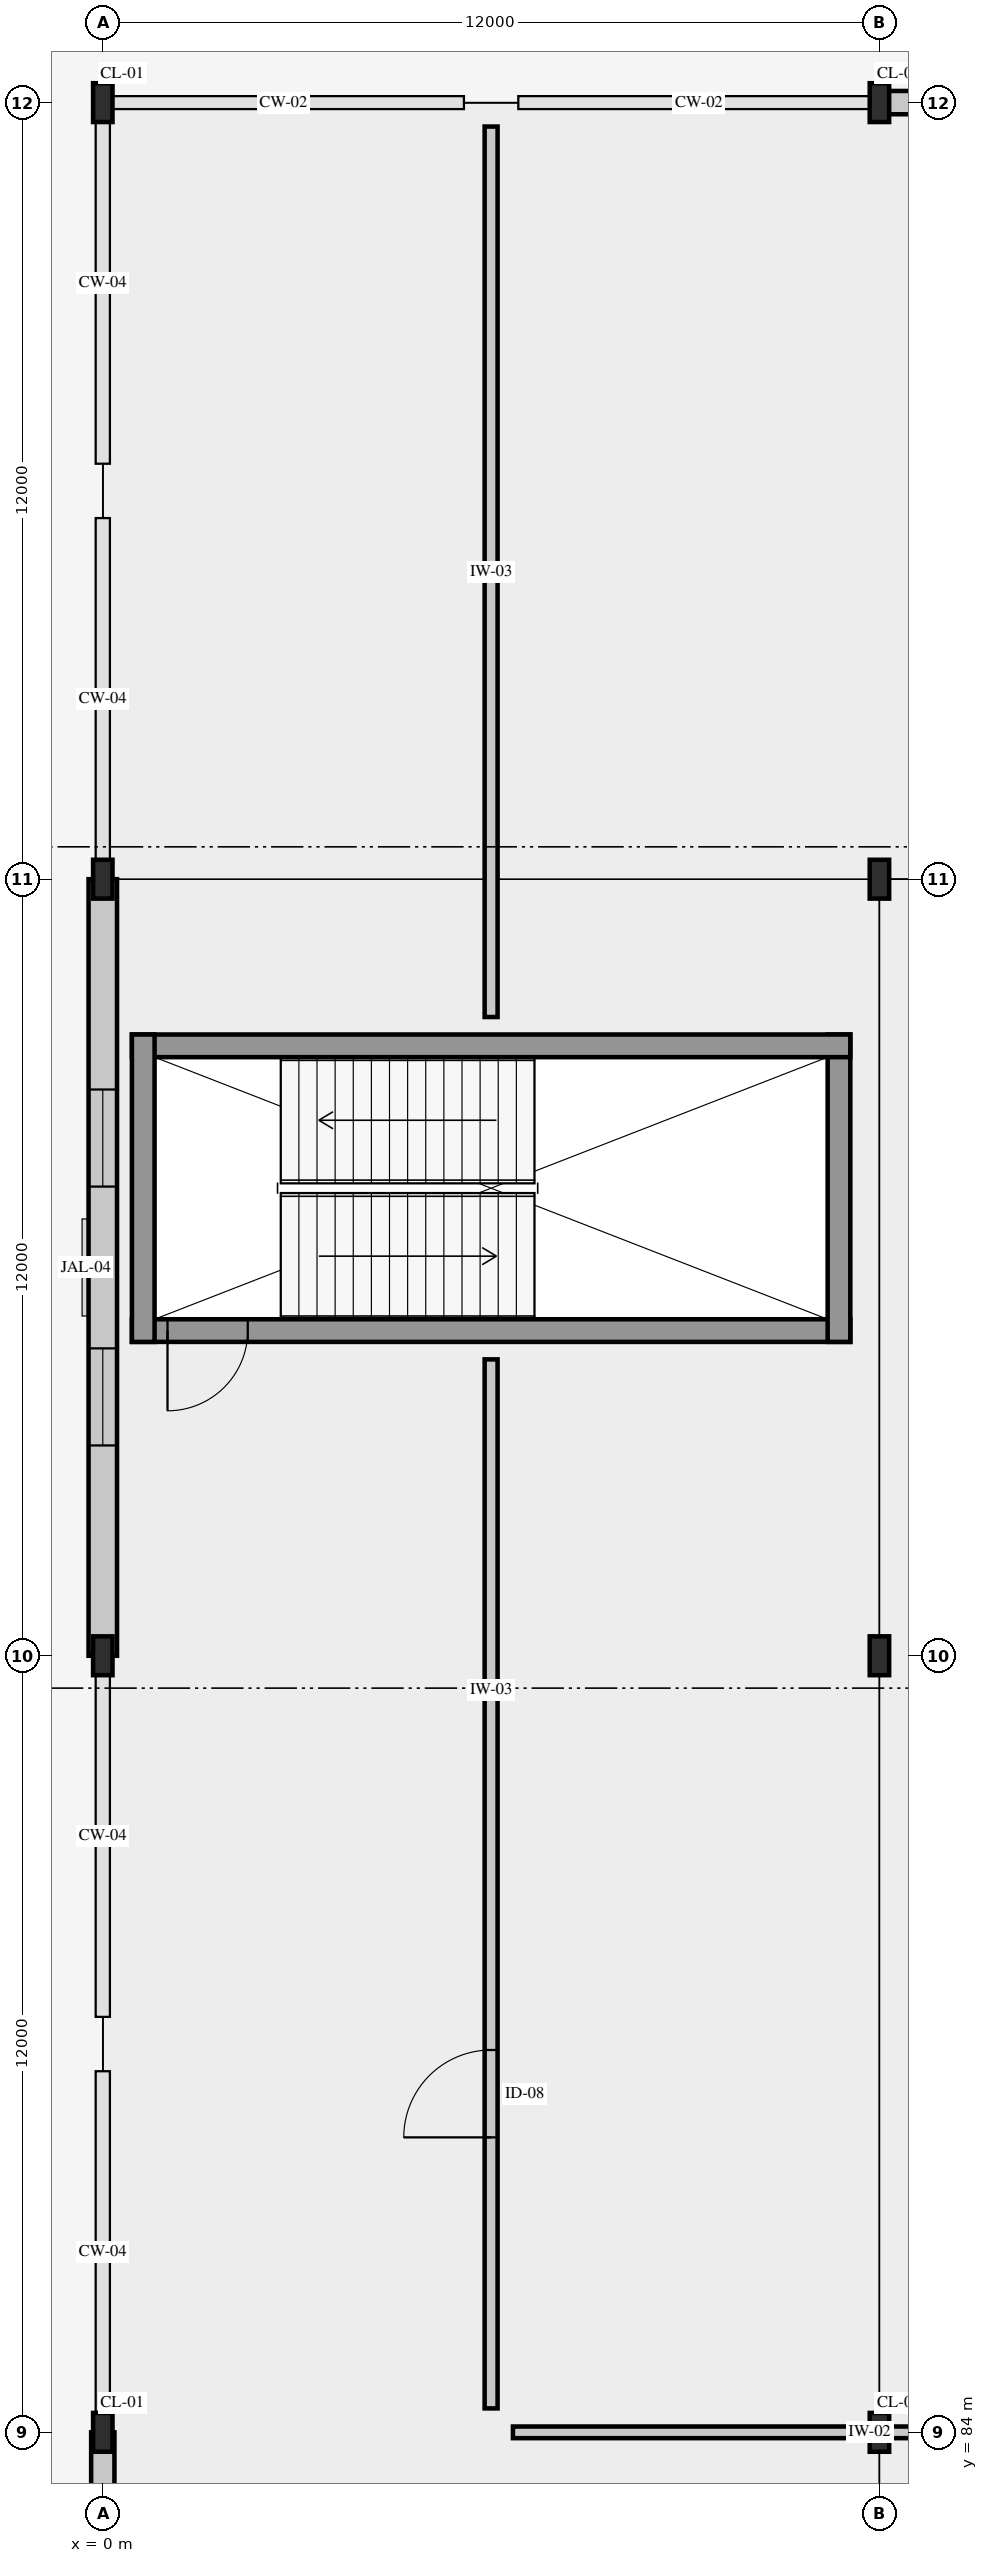
"""IFC4 building model, lengths in metres.
Left out: names, types, materials, properties, quantities, classifications, styles, units other than length and angle.
Written with IfcOpenShell. Run it as: python <this file> out.ifc"""

import sys

from ifc_helpers import new_model, si_unit, direction, frame, frame_2d, origin, origin_2d, place, context, subcontext, project, spatial, rectangle, i_section, extrude, element, fill, save


model = new_model("IFC4")
c1 = context("Model", 3, precision=1e-05, world=origin(), true_north=direction((0.0, 1.0)))
c2 = subcontext(c1, "Body", "Model", "MODEL_VIEW")
j1 = project(units=[si_unit("LENGTHUNIT", "METRE"), si_unit("PLANEANGLEUNIT", "RADIAN")], contexts=[c1])
p1 = place(None, origin())
s1 = spatial("IfcSite", under=j1, at=p1, CompositionType="ELEMENT")
p2 = place(p1, origin())
s2 = spatial("IfcBuilding", under=s1, at=p2, CompositionType="ELEMENT")
p3 = place(p2, origin())
s3 = spatial("IfcBuildingStorey", under=s2, at=p3, CompositionType="ELEMENT", Elevation=0.0)
for number, where, z_axis, x_axis in (
    (1, (0.0, 84.0, 0.0), (0.0, 0.0, 1.0), (1.0, 0.0, 0.0)),
    (2, (0.0, 96.0, 0.0), (0.0, 0.0, 1.0), (1.0, 0.0, 0.0)),
    (3, (0.0, 108.0, 0.0), (0.0, 0.0, 1.0), (1.0, 0.0, 0.0)),
    (4, (0.0, 120.0, 0.0), (0.0, 0.0, 1.0), (1.0, 0.0, 0.0)),
    (5, (12.0, 84.0, 0.0), (0.0, 0.0, 1.0), (1.0, 0.0, 0.0)),
    (6, (12.0, 96.0, 0.0), (0.0, 0.0, 1.0), (1.0, 0.0, 0.0)),
    (7, (12.0, 108.0, 0.0), (0.0, 0.0, 1.0), (1.0, 0.0, 0.0)),
    (8, (12.0, 120.0, 0.0), (0.0, 0.0, 1.0), (1.0, 0.0, 0.0)),
):
    element("IfcColumn", number, at=place(p3, frame(where, z_axis=z_axis, x_axis=x_axis)), inside=s3, PredefinedType="COLUMN", context=c2, shape_type="SweptSolid", body=[
        extrude(i_section(OverallWidth=0.3, OverallDepth=0.6, WebThickness=0.015, FlangeThickness=0.03, FilletRadius=0.027, at=origin_2d()), origin(), (0.0, 0.0, 1.0), 5.4),
    ])
p4 = place(p3, frame((0.0, 84.0, 0.0), z_axis=(0.0, 0.0, 1.0), x_axis=(0.0, -1.0, 0.0)))
e9 = element("IfcWall", 9, at=p4, inside=s3, PredefinedType="SOLIDWALL", context=c2, shape_type="SweptSolid", body=[
    extrude(rectangle(XDim=9.6, YDim=0.36, at=frame_2d((4.8, 0.0))), origin(), (0.0, 0.0, 1.0), 4.52),
])
p5 = place(p4, frame((2.525, 0.0, 0.95)))
e10 = element("IfcOpeningElement", 10, at=p5, cuts=e9, PredefinedType="OPENING", context=c2, shape_type="SweptSolid", body=[
    extrude(rectangle(XDim=1.35, YDim=1.5, at=frame_2d((0.675, 0.75))), frame((0.0, 0.19, 0.0), z_axis=(0.0, -1.0, 0.0), x_axis=(1.0, 0.0, 0.0)), (0.0, 0.0, 1.0), 0.38),
])
p6 = place(p4, frame((5.725, 0.0, 0.95)))
e11 = element("IfcOpeningElement", 11, at=p6, cuts=e9, PredefinedType="OPENING", context=c2, shape_type="SweptSolid", body=[
    extrude(rectangle(XDim=1.35, YDim=1.5, at=frame_2d((0.675, 0.75))), frame((0.0, 0.19, 0.0), z_axis=(0.0, -1.0, 0.0), x_axis=(1.0, 0.0, 0.0)), (0.0, 0.0, 1.0), 0.38),
])
p7 = place(p3, frame((0.0, 108.0, 0.0), z_axis=(0.0, 0.0, 1.0), x_axis=(0.0, -1.0, 0.0)))
e12 = element("IfcWall", 12, at=p7, inside=s3, PredefinedType="SOLIDWALL", context=c2, shape_type="SweptSolid", body=[
    extrude(rectangle(XDim=12.0, YDim=0.44, at=frame_2d((6.0, 0.0))), origin(), (0.0, 0.0, 1.0), 4.52),
])
p8 = place(p7, frame((3.25, 0.0, 0.95)))
e13 = element("IfcOpeningElement", 13, at=p8, cuts=e12, PredefinedType="OPENING", context=c2, shape_type="SweptSolid", body=[
    extrude(rectangle(XDim=1.5, YDim=1.5, at=frame_2d((0.75, 0.75))), frame((0.0, 0.23, 0.0), z_axis=(0.0, -1.0, 0.0), x_axis=(1.0, 0.0, 0.0)), (0.0, 0.0, 1.0), 0.46),
])
p9 = place(p7, frame((7.25, 0.0, 0.95)))
e14 = element("IfcOpeningElement", 14, at=p9, cuts=e12, PredefinedType="OPENING", context=c2, shape_type="SweptSolid", body=[
    extrude(rectangle(XDim=1.5, YDim=1.5, at=frame_2d((0.75, 0.75))), frame((0.0, 0.23, 0.0), z_axis=(0.0, -1.0, 0.0), x_axis=(1.0, 0.0, 0.0)), (0.0, 0.0, 1.0), 0.46),
])
p10 = place(p3, frame((24.0, 120.0, 0.0), z_axis=(0.0, 0.0, 1.0), x_axis=(-1.0, 0.0, 0.0)))
e15 = element("IfcWall", 15, at=p10, inside=s3, PredefinedType="SOLIDWALL", context=c2, shape_type="SweptSolid", body=[
    extrude(rectangle(XDim=12.0, YDim=0.36, at=frame_2d((6.0, 0.0))), origin(), (0.0, 0.0, 1.0), 4.56),
])
p11 = place(p10, frame((1.96, 0.0, 0.0)))
e16 = element("IfcOpeningElement", 16, at=p11, cuts=e15, PredefinedType="OPENING", context=c2, shape_type="SweptSolid", body=[
    extrude(rectangle(XDim=2.8, YDim=2.8, at=frame_2d((1.4, 1.4))), frame((0.0, 0.19, 0.0), z_axis=(0.0, -1.0, 0.0), x_axis=(1.0, 0.0, 0.0)), (0.0, 0.0, 1.0), 0.38),
])
p12 = place(p10, frame((7.44, 0.0, 0.0)))
e17 = element("IfcOpeningElement", 17, at=p12, cuts=e15, PredefinedType="OPENING", context=c2, shape_type="SweptSolid", body=[
    extrude(rectangle(XDim=2.4, YDim=2.6, at=frame_2d((1.2, 1.3))), frame((0.0, 0.19, 0.0), z_axis=(0.0, -1.0, 0.0), x_axis=(1.0, 0.0, 0.0)), (0.0, 0.0, 1.0), 0.38),
])
p13 = place(p3, frame((0.45, 101.025, 0.0), z_axis=(0.0, 0.0, 1.0), x_axis=(1.0, 0.0, 0.0)))
e18 = element("IfcWall", 18, at=p13, inside=s3, PredefinedType="SHEAR", context=c2, shape_type="SweptSolid", body=[
    extrude(rectangle(XDim=11.1, YDim=0.35, at=frame_2d((5.55, 0.0))), origin(), (0.0, 0.0, 1.0), 5.14),
])
p14 = place(p13, frame((0.55, 0.0, 0.0)))
e19 = element("IfcOpeningElement", 19, at=p14, cuts=e18, PredefinedType="OPENING", context=c2, shape_type="SweptSolid", body=[
    extrude(rectangle(XDim=1.24, YDim=2.25, at=frame_2d((0.62, 1.125))), frame((0.0, 0.185, 0.0), z_axis=(0.0, -1.0, 0.0), x_axis=(1.0, 0.0, 0.0)), (0.0, 0.0, 1.0), 0.37),
])
p15 = place(p3, frame((11.375, 100.85, 0.0), z_axis=(0.0, 0.0, 1.0), x_axis=(0.0, 1.0, 0.0)))
e20 = element("IfcWall", 20, at=p15, inside=s3, PredefinedType="SHEAR", context=c2, shape_type="SweptSolid", body=[
    extrude(rectangle(XDim=4.75, YDim=0.35, at=frame_2d((2.375, 0.0))), origin(), (0.0, 0.0, 1.0), 5.14),
])
p16 = place(p3, frame((11.55, 105.425, 0.0), z_axis=(0.0, 0.0, 1.0), x_axis=(-1.0, 0.0, 0.0)))
e21 = element("IfcWall", 21, at=p16, inside=s3, PredefinedType="SHEAR", context=c2, shape_type="SweptSolid", body=[
    extrude(rectangle(XDim=11.1, YDim=0.35, at=frame_2d((5.55, 0.0))), origin(), (0.0, 0.0, 1.0), 5.14),
])
p17 = place(p3, frame((0.625, 105.6, 0.0), z_axis=(0.0, 0.0, 1.0), x_axis=(0.0, -1.0, 0.0)))
e22 = element("IfcWall", 22, at=p17, inside=s3, PredefinedType="SHEAR", context=c2, shape_type="SweptSolid", body=[
    extrude(rectangle(XDim=4.75, YDim=0.35, at=frame_2d((2.375, 0.0))), origin(), (0.0, 0.0, 1.0), 5.14),
])
p18 = place(p3, frame((6.337, 84.0, 0.0), z_axis=(0.0, 0.0, 1.0), x_axis=(1.0, 0.0, 0.0)))
e23 = element("IfcWall", 23, at=p18, inside=s3, PredefinedType="PARTITIONING", context=c2, shape_type="SweptSolid", body=[
    extrude(rectangle(XDim=17.105, YDim=0.18, at=frame_2d((8.553, 0.0))), origin(), (0.0, 0.0, 1.0), 4.53),
])
p19 = place(p18, frame((11.374, 0.0, 0.0)))
e24 = element("IfcOpeningElement", 24, at=p19, cuts=e23, PredefinedType="OPENING", context=c2, shape_type="SweptSolid", body=[
    extrude(rectangle(XDim=1.2, YDim=2.3, at=frame_2d((0.6, 1.15))), frame((0.0, 0.1, 0.0), z_axis=(0.0, -1.0, 0.0), x_axis=(1.0, 0.0, 0.0)), (0.0, 0.0, 1.0), 0.2),
])
p20 = place(p3, frame((6.0, 84.37, 0.0), z_axis=(0.0, 0.0, 1.0), x_axis=(0.0, 1.0, 0.0)))
e25 = element("IfcWall", 25, at=p20, inside=s3, PredefinedType="PARTITIONING", context=c2, shape_type="SweptSolid", body=[
    extrude(rectangle(XDim=16.21, YDim=0.2, at=frame_2d((8.105, 0.0))), origin(), (0.0, 0.0, 1.0), 4.53),
])
p21 = place(p20, frame((4.188, 0.0, 0.0)))
e26 = element("IfcOpeningElement", 26, at=p21, cuts=e25, PredefinedType="OPENING", context=c2, shape_type="SweptSolid", body=[
    extrude(rectangle(XDim=1.35, YDim=2.3, at=frame_2d((0.675, 1.15))), frame((0.0, 0.11, 0.0), z_axis=(0.0, -1.0, 0.0), x_axis=(1.0, 0.0, 0.0)), (0.0, 0.0, 1.0), 0.22),
])
p22 = place(p3, frame((6.0, 105.87, 0.0), z_axis=(0.0, 0.0, 1.0), x_axis=(0.0, 1.0, 0.0)))
e27 = element("IfcWall", 27, at=p22, inside=s3, PredefinedType="PARTITIONING", context=c2, shape_type="SweptSolid", body=[
    extrude(rectangle(XDim=13.76, YDim=0.2, at=frame_2d((6.88, 0.0))), origin(), (0.0, 0.0, 1.0), 4.53),
])
p23 = place(p8, origin())
e28 = element("IfcWindow", 28, at=p23, inside=s3, PartitioningType="SINGLE_PANEL", PredefinedType="WINDOW", context=c2, shape_type="SweptSolid", body=[
    extrude(rectangle(XDim=1.5, YDim=1.5, at=frame_2d((0.75, 0.75))), frame((0.0, 0.03, 0.0), z_axis=(0.0, -1.0, 0.0), x_axis=(1.0, 0.0, 0.0)), (0.0, 0.0, 1.0), 0.06),
])
fill(e13, e28)
p24 = place(p9, origin())
e29 = element("IfcWindow", 29, at=p24, inside=s3, PartitioningType="SINGLE_PANEL", PredefinedType="WINDOW", context=c2, shape_type="SweptSolid", body=[
    extrude(rectangle(XDim=1.5, YDim=1.5, at=frame_2d((0.75, 0.75))), frame((0.0, 0.03, 0.0), z_axis=(0.0, -1.0, 0.0), x_axis=(1.0, 0.0, 0.0)), (0.0, 0.0, 1.0), 0.06),
])
fill(e14, e29)
p25 = place(p14, frame((1.24, 0.0, 0.0), z_axis=(0.0, 0.0, 1.0), x_axis=(-1.0, 0.0, 0.0)))
e30 = element("IfcDoor", 30, at=p25, inside=s3, OperationType="SINGLE_SWING_LEFT", PredefinedType="DOOR", context=c2, shape_type="SweptSolid", body=[
    extrude(rectangle(XDim=1.24, YDim=2.25, at=frame_2d((0.62, 1.125))), frame((0.0, 0.025, 0.0), z_axis=(0.0, -1.0, 0.0), x_axis=(1.0, 0.0, 0.0)), (0.0, 0.0, 1.0), 0.05),
])
fill(e19, e30)
p26 = place(p21, origin())
e31 = element("IfcDoor", 31, at=p26, inside=s3, OperationType="DOUBLE_SWING_LEFT", PredefinedType="DOOR", context=c2, shape_type="SweptSolid", body=[
    extrude(rectangle(XDim=1.35, YDim=2.3, at=frame_2d((0.675, 1.15))), frame((0.0, 0.025, 0.0), z_axis=(0.0, -1.0, 0.0), x_axis=(1.0, 0.0, 0.0)), (0.0, 0.0, 1.0), 0.05),
])
fill(e26, e31)
save(model, sys.argv[1])
